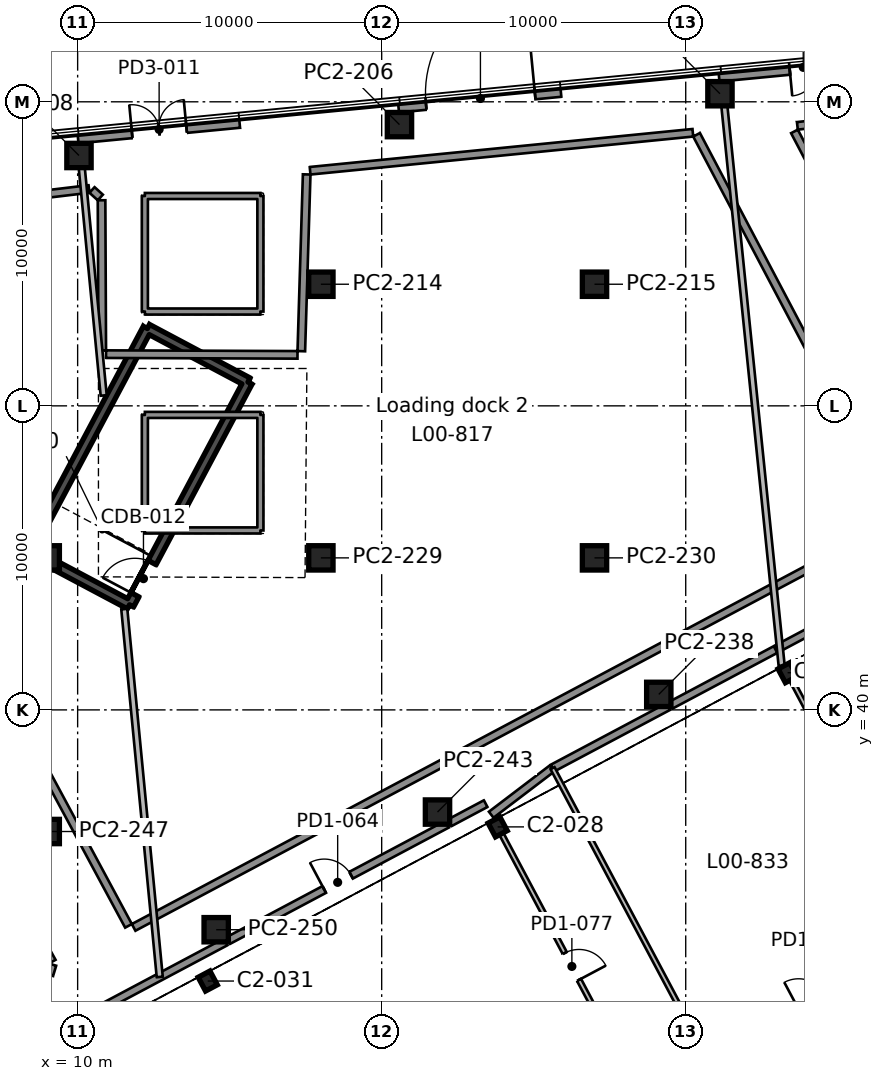
"""IFC4 building model, lengths in metres.
Left out: names, types, materials, properties, quantities, classifications, styles, units other than length and angle.
Written with IfcOpenShell. Run it as: python <this file> out.ifc"""

import sys

from ifc_helpers import new_model, si_unit, direction, frame, frame_2d, origin, origin_2d, place, context, subcontext, project, spatial, rectangle, i_section, extrude, element, fill, save


model = new_model("IFC4")
c1 = context("Model", 3, precision=1e-05, world=origin(), true_north=direction((0.0, 1.0)))
c2 = subcontext(c1, "Body", "Model", "MODEL_VIEW")
j1 = project(units=[si_unit("LENGTHUNIT", "METRE"), si_unit("PLANEANGLEUNIT", "RADIAN")], contexts=[c1])
p1 = place(None, origin())
s1 = spatial("IfcSite", under=j1, at=p1, CompositionType="ELEMENT")
p2 = place(p1, origin())
s2 = spatial("IfcBuilding", under=s1, at=p2, CompositionType="ELEMENT")
p3 = place(p2, origin())
s3 = spatial("IfcBuildingStorey", under=s2, at=p3, CompositionType="ELEMENT", Elevation=0.0)
for number, where, z_axis, x_axis in (
    (1, (14.279, 31.082, 0.0), (0.0, 0.0, 1.0), (-0.883, -0.469, 0.0)),
    (2, (23.815, 36.152, 0.0), (0.0, 0.0, 1.0), (-0.883, -0.469, 0.0)),
    (3, (33.351, 41.223, 0.0), (0.0, 0.0, 1.0), (-0.883, -0.469, 0.0)),
):
    element("IfcColumn", number, at=place(p3, frame(where, z_axis=z_axis, x_axis=x_axis)), inside=s3, PredefinedType="COLUMN", context=c2, shape_type="SweptSolid", body=[
        extrude(i_section(OverallWidth=0.437, OverallDepth=0.513, WebThickness=0.061, FlangeThickness=0.097, FilletRadius=0.015, at=origin_2d()), origin(), (0.0, 0.0, 1.0), 7.0),
    ])
p4 = place(p3, frame((12.293, 52.544, 0.0), z_axis=(0.0, 0.0, 1.0), x_axis=(0.882948761726, -0.46946936446, 0.0)))
e4 = element("IfcWall", 4, at=p4, inside=s3, PredefinedType="SHEAR", context=c2, shape_type="SweptSolid", body=[
    extrude(rectangle(XDim=3.75, YDim=0.3, at=frame_2d((1.875, 0.0))), origin(), (0.0, 0.0, 1.0), 7.0),
])
p5 = place(p3, frame((15.604, 50.784, 0.0), z_axis=(0.0, 0.0, 1.0), x_axis=(-0.469464178475, -0.882951519127, 0.0)))
e5 = element("IfcWall", 5, at=p5, inside=s3, PredefinedType="SHEAR", context=c2, shape_type="SweptSolid", body=[
    extrude(rectangle(XDim=8.3, YDim=0.3, at=frame_2d((4.15, 0.0))), origin(), (0.0, 0.0, 1.0), 7.0),
])
p6 = place(p5, frame((6.725, 0.0, 0.0)))
e6 = element("IfcOpeningElement", 6, at=p6, cuts=e5, PredefinedType="OPENING", context=c2, shape_type="SweptSolid", body=[
    extrude(rectangle(XDim=1.2, YDim=2.1, at=frame_2d((0.6, 1.05))), frame((0.0, 0.16, 0.0), z_axis=(0.0, -1.0, 0.0), x_axis=(1.0, 0.0, 0.0)), (0.0, 0.0, 1.0), 0.32),
])
p7 = place(p3, frame((11.707, 43.456, 0.0), z_axis=(0.0, 0.0, 1.0), x_axis=(-0.882948761726, 0.46946936446, 0.0)))
e7 = element("IfcWall", 7, at=p7, inside=s3, PredefinedType="SHEAR", context=c2, shape_type="SweptSolid", body=[
    extrude(rectangle(XDim=3.75, YDim=0.3, at=frame_2d((1.875, 0.0))), origin(), (0.0, 0.0, 1.0), 7.0),
])
p8 = place(p3, frame((8.396, 45.216, 0.0), z_axis=(0.0, 0.0, 1.0), x_axis=(0.469464178475, 0.882951519127, 0.0)))
e8 = element("IfcWall", 8, at=p8, inside=s3, PredefinedType="SHEAR", context=c2, shape_type="SweptSolid", body=[
    extrude(rectangle(XDim=8.3, YDim=0.3, at=frame_2d((4.15, 0.0))), origin(), (0.0, 0.0, 1.0), 7.0),
])
for number, where, z_axis, x_axis in (
    (9, (14.557, 32.77, 0.0), (0.0, 0.0, 1.0), (1.0, 0.0, 0.0)),
    (10, (9.0, 36.0, 0.0), (0.0, 0.0, 1.0), (1.0, 0.0, 0.0)),
    (11, (21.836, 36.64, 0.0), (0.0, 0.0, 1.0), (1.0, 0.0, 0.0)),
    (12, (29.114, 40.51, 0.0), (0.0, 0.0, 1.0), (1.0, 0.0, 0.0)),
    (13, (9.0, 45.0, 0.0), (0.0, 0.0, 1.0), (1.0, 0.0, 0.0)),
    (14, (18.0, 45.0, 0.0), (0.0, 0.0, 1.0), (1.0, 0.0, 0.0)),
    (15, (27.0, 45.0, 0.0), (0.0, 0.0, 1.0), (1.0, 0.0, 0.0)),
    (16, (18.0, 54.0, 0.0), (0.0, 0.0, 1.0), (1.0, 0.0, 0.0)),
    (17, (27.0, 54.0, 0.0), (0.0, 0.0, 1.0), (1.0, 0.0, 0.0)),
    (18, (10.044, 58.234, 0.0), (0.0, 0.0, 1.0), (1.0, 0.0, 0.0)),
    (19, (20.585, 59.25, 0.0), (0.0, 0.0, 1.0), (1.0, 0.0, 0.0)),
    (20, (31.126, 60.266, 0.0), (0.0, 0.0, 1.0), (1.0, 0.0, 0.0)),
):
    element("IfcColumn", number, at=place(p3, frame(where, z_axis=z_axis, x_axis=x_axis)), inside=s3, PredefinedType="COLUMN", context=c2, shape_type="SweptSolid", body=[
        extrude(rectangle(XDim=0.8, YDim=0.8, at=origin_2d()), origin(), (0.0, 0.0, 1.0), 6.37),
    ])
p9 = place(p3, frame((36.458, 61.382, 0.0), z_axis=(0.0, 0.0, 1.0), x_axis=(-0.99538901021, -0.095920375068, 0.0)))
e21 = element("IfcWall", 21, at=p9, inside=s3, PredefinedType="SOLIDWALL", context=c2, shape_type="SweptSolid", body=[
    extrude(rectangle(XDim=5.391, YDim=0.4, at=frame_2d((2.695, 0.0))), origin(), (0.0, 0.0, 1.0), 6.37),
])
p10 = place(p9, frame((2.154, 0.0, 0.0)))
e22 = element("IfcOpeningElement", 22, at=p10, cuts=e21, PredefinedType="OPENING", context=c2, shape_type="SweptSolid", body=[
    extrude(rectangle(XDim=0.9, YDim=2.1, at=frame_2d((0.45, 1.05))), frame((0.0, 0.21, 0.0), z_axis=(0.0, -1.0, 0.0), x_axis=(1.0, 0.0, 0.0)), (0.0, 0.0, 1.0), 0.42),
])
p11 = place(p3, frame((25.89, 60.364, 0.0), z_axis=(0.0, 0.0, 1.0), x_axis=(-0.995386401867, -0.095947438618, 0.0)))
e23 = element("IfcWall", 23, at=p11, inside=s3, PredefinedType="SOLIDWALL", context=c2, shape_type="SweptSolid", body=[
    extrude(rectangle(XDim=5.364, YDim=0.4, at=frame_2d((2.682, 0.0))), origin(), (0.0, 0.0, 1.0), 6.37),
])
p12 = place(p11, frame((0.854, 0.0, 0.0)))
e24 = element("IfcOpeningElement", 24, at=p12, cuts=e23, PredefinedType="OPENING", context=c2, shape_type="SweptSolid", body=[
    extrude(rectangle(XDim=3.6, YDim=4.5, at=frame_2d((1.8, 2.25))), frame((0.0, 0.21, 0.0), z_axis=(0.0, -1.0, 0.0), x_axis=(1.0, 0.0, 0.0)), (0.0, 0.0, 1.0), 0.42),
])
p13 = place(p3, frame((15.322, 59.345, 0.0), z_axis=(0.0, 0.0, 1.0), x_axis=(-0.995385451448, -0.095957298035, 0.0)))
e25 = element("IfcWall", 25, at=p13, inside=s3, PredefinedType="SOLIDWALL", context=c2, shape_type="SweptSolid", body=[
    extrude(rectangle(XDim=5.338, YDim=0.4, at=frame_2d((2.669, 0.0))), origin(), (0.0, 0.0, 1.0), 6.37),
])
p14 = place(p13, frame((1.754, 0.0, 0.0)))
e26 = element("IfcOpeningElement", 26, at=p14, cuts=e25, PredefinedType="OPENING", context=c2, shape_type="SweptSolid", body=[
    extrude(rectangle(XDim=1.8, YDim=2.1, at=frame_2d((0.9, 1.05))), frame((0.0, 0.21, 0.0), z_axis=(0.0, -1.0, 0.0), x_axis=(1.0, 0.0, 0.0)), (0.0, 0.0, 1.0), 0.42),
])
p15 = place(p3, frame((9.175, 31.622, 7.0), z_axis=(0.0, 0.0, 1.0), x_axis=(-0.291902944201, -0.956447944829, 0.0)))
e27 = element("IfcWall", 27, at=p15, inside=s3, PredefinedType="STANDARD", context=c2, shape_type="SweptSolid", body=[
    extrude(rectangle(XDim=0.354, YDim=0.25, at=frame_2d((0.177, 0.0))), origin(), (0.0, 0.0, 1.0), 0.65),
])
p16 = place(p3, frame((-0.568, 49.302, 7.0), z_axis=(0.0, 0.0, 1.0), x_axis=(0.484320034281, -0.874890909996, 0.0)))
e28 = element("IfcWall", 28, at=p16, inside=s3, PredefinedType="STANDARD", context=c2, shape_type="SweptSolid", body=[
    extrude(rectangle(XDim=20.096, YDim=0.25, at=frame_2d((10.048, 0.0))), origin(), (0.0, 0.0, 1.0), 0.65),
])
p17 = place(p3, frame((2.855, 56.234, 7.0), z_axis=(0.0, 0.0, 1.0), x_axis=(0.992929675545, 0.118704083423, 0.0)))
e29 = element("IfcWall", 29, at=p17, inside=s3, PredefinedType="STANDARD", context=c2, shape_type="SweptSolid", body=[
    extrude(rectangle(XDim=7.573, YDim=0.25, at=frame_2d((3.786, 0.0))), origin(), (0.0, 0.0, 1.0), 0.65),
])
p18 = place(p3, frame((10.473, 57.101, 7.0), z_axis=(0.0, 0.0, 1.0), x_axis=(0.740419787082, -0.672144730618, 0.0)))
e30 = element("IfcWall", 30, at=p18, inside=s3, PredefinedType="STANDARD", context=c2, shape_type="SweptSolid", body=[
    extrude(rectangle(XDim=0.368, YDim=0.25, at=frame_2d((0.184, 0.0))), origin(), (0.0, 0.0, 1.0), 0.65),
])
p19 = place(p3, frame((10.787, 56.762, 7.0), z_axis=(0.0, 0.0, 1.0), x_axis=(0.004598903003, -0.99998942499, 0.0)))
e31 = element("IfcWall", 31, at=p19, inside=s3, PredefinedType="STANDARD", context=c2, shape_type="SweptSolid", body=[
    extrude(rectangle(XDim=4.937, YDim=0.25, at=frame_2d((2.469, 0.0))), origin(), (0.0, 0.0, 1.0), 0.65),
])
p20 = place(p3, frame((10.934, 51.7, 7.0), z_axis=(0.0, 0.0, 1.0), x_axis=(0.999993217199, -0.00368314487, 0.0)))
e32 = element("IfcWall", 32, at=p20, inside=s3, PredefinedType="STANDARD", context=c2, shape_type="SweptSolid", body=[
    extrude(rectangle(XDim=6.297, YDim=0.25, at=frame_2d((3.148, 0.0))), origin(), (0.0, 0.0, 1.0), 0.65),
])
p21 = place(p3, frame((17.356, 51.798, 7.0), z_axis=(0.0, 0.0, 1.0), x_axis=(0.030389518646, 0.999538131917, 0.0)))
e33 = element("IfcWall", 33, at=p21, inside=s3, PredefinedType="STANDARD", context=c2, shape_type="SweptSolid", body=[
    extrude(rectangle(XDim=5.816, YDim=0.25, at=frame_2d((2.908, 0.0))), origin(), (0.0, 0.0, 1.0), 0.65),
])
p22 = place(p3, frame((17.646, 57.732, 7.0), z_axis=(0.0, 0.0, 1.0), x_axis=(0.9951157931, 0.098714529444, 0.0)))
e34 = element("IfcWall", 34, at=p22, inside=s3, PredefinedType="STANDARD", context=c2, shape_type="SweptSolid", body=[
    extrude(rectangle(XDim=12.65, YDim=0.25, at=frame_2d((6.325, 0.0))), origin(), (0.0, 0.0, 1.0), 0.65),
])
p23 = place(p3, frame((30.357, 58.915, 7.0), z_axis=(0.0, 0.0, 1.0), x_axis=(0.466457319903, -0.8845437065, 0.0)))
e35 = element("IfcWall", 35, at=p23, inside=s3, PredefinedType="STANDARD", context=c2, shape_type="SweptSolid", body=[
    extrude(rectangle(XDim=14.208, YDim=0.25, at=frame_2d((7.104, 0.0))), origin(), (0.0, 0.0, 1.0), 0.65),
])
p24 = place(p3, frame((36.929, 46.186, 7.0), z_axis=(0.0, 0.0, 1.0), x_axis=(-0.882949235495, -0.469468473423, 0.0)))
e36 = element("IfcWall", 36, at=p24, inside=s3, PredefinedType="STANDARD", context=c2, shape_type="SweptSolid", body=[
    extrude(rectangle(XDim=28.414, YDim=0.25, at=frame_2d((14.207, 0.0))), origin(), (0.0, 0.0, 1.0), 0.65),
])
p25 = place(p3, frame((11.673, 32.897, 7.0), z_axis=(0.0, 0.0, 1.0), x_axis=(-0.474018312506, 0.880514985341, 0.0)))
e37 = element("IfcWall", 37, at=p25, inside=s3, PredefinedType="STANDARD", context=c2, shape_type="SweptSolid", body=[
    extrude(rectangle(XDim=22.327, YDim=0.25, at=frame_2d((11.164, 0.0))), origin(), (0.0, 0.0, 1.0), 0.65),
])
p26 = place(p3, frame((39.532, 47.701, 7.0), z_axis=(0.0, 0.0, 1.0), x_axis=(-0.465482185558, 0.88505724952, 0.0)))
e38 = element("IfcWall", 38, at=p26, inside=s3, PredefinedType="STANDARD", context=c2, shape_type="SweptSolid", body=[
    extrude(rectangle(XDim=12.795, YDim=0.25, at=frame_2d((6.398, 0.0))), origin(), (0.0, 0.0, 1.0), 0.65),
])
p27 = place(p3, frame((33.673, 59.208, 7.0), z_axis=(0.0, 0.0, 1.0), x_axis=(0.993598399312, 0.112969999932, 0.0)))
e39 = element("IfcWall", 39, at=p27, inside=s3, PredefinedType="STANDARD", context=c2, shape_type="SweptSolid", body=[
    extrude(rectangle(XDim=9.9, YDim=0.25, at=frame_2d((4.95, 0.0))), origin(), (0.0, 0.0, 1.0), 0.65),
])
p28 = place(p3, frame((16.011, 45.902, 6.92), z_axis=(0.0, 0.0, 1.0), x_axis=(-1.0, 0.0, 0.0)))
e40 = element("IfcWall", 40, at=p28, inside=s3, PredefinedType="SOLIDWALL", context=c2, shape_type="SweptSolid", body=[
    extrude(rectangle(XDim=3.8, YDim=0.2, at=frame_2d((1.9, 0.0))), origin(), (0.0, 0.0, 1.0), 0.18),
])
p29 = place(p3, frame((12.211, 45.902, 6.92), z_axis=(0.0, 0.0, 1.0), x_axis=(0.0, 1.0, 0.0)))
e41 = element("IfcWall", 41, at=p29, inside=s3, PredefinedType="SOLIDWALL", context=c2, shape_type="SweptSolid", body=[
    extrude(rectangle(XDim=3.8, YDim=0.2, at=frame_2d((1.9, 0.0))), origin(), (0.0, 0.0, 1.0), 0.18),
])
p30 = place(p3, frame((12.211, 49.702, 6.92), z_axis=(0.0, 0.0, 1.0), x_axis=(1.0, 0.0, 0.0)))
e42 = element("IfcWall", 42, at=p30, inside=s3, PredefinedType="SOLIDWALL", context=c2, shape_type="SweptSolid", body=[
    extrude(rectangle(XDim=3.8, YDim=0.2, at=frame_2d((1.9, 0.0))), origin(), (0.0, 0.0, 1.0), 0.18),
])
p31 = place(p3, frame((16.011, 49.702, 6.92), z_axis=(0.0, 0.0, 1.0), x_axis=(0.0, -1.0, 0.0)))
e43 = element("IfcWall", 43, at=p31, inside=s3, PredefinedType="SOLIDWALL", context=c2, shape_type="SweptSolid", body=[
    extrude(rectangle(XDim=3.8, YDim=0.2, at=frame_2d((1.9, 0.0))), origin(), (0.0, 0.0, 1.0), 0.18),
])
for number, where, z_axis, x_axis in (
    (44, (16.011, 53.102, 6.92), (0.0, 0.0, 1.0), (-1.0, 0.0, 0.0)),
    (45, (12.211, 53.102, 6.92), (0.0, 0.0, 1.0), (0.0, 1.0, 0.0)),
    (46, (12.211, 56.902, 6.92), (0.0, 0.0, 1.0), (1.0, 0.0, 0.0)),
    (47, (16.011, 56.902, 6.92), (0.0, 0.0, 1.0), (0.0, -1.0, 0.0)),
):
    element("IfcWall", number, at=place(p3, frame(where, z_axis=z_axis, x_axis=x_axis)), inside=s3, PredefinedType="SOLIDWALL", context=c2, shape_type="SweptSolid", body=[
        extrude(rectangle(XDim=3.8, YDim=0.2, at=frame_2d((1.9, 0.0))), origin(), (0.0, 0.0, 1.0), 0.18),
    ])
p32 = place(p3, frame((31.271, 59.866, 0.0), z_axis=(0.0, 0.0, 1.0), x_axis=(0.10182537806, -0.994802288087, 0.0)))
e48 = element("IfcWall", 48, at=p32, inside=s3, PredefinedType="PARTITIONING", context=c2, shape_type="SweptSolid", body=[
    extrude(rectangle(XDim=18.51, YDim=0.2, at=frame_2d((9.255, 0.0))), origin(), (0.0, 0.0, 1.0), 6.37),
])
p33 = place(p3, frame((32.989, 42.004, 0.0), z_axis=(0.0, 0.0, 1.0), x_axis=(0.882961044449, 0.46944626315, 0.0)))
e49 = element("IfcWall", 49, at=p33, inside=s3, PredefinedType="SOLIDWALL", context=c2, shape_type="SweptSolid", body=[
    extrude(rectangle(XDim=2.453, YDim=0.25, at=frame_2d((1.227, 0.0))), origin(), (0.0, 0.0, 1.0), 6.37),
])
p34 = place(p3, frame((10.135, 57.834, 0.0), z_axis=(0.0, 0.0, 1.0), x_axis=(0.095941692949, -0.995386955688, 0.0)))
e50 = element("IfcWall", 50, at=p34, inside=s3, PredefinedType="PARTITIONING", context=c2, shape_type="SweptSolid", body=[
    extrude(rectangle(XDim=7.527, YDim=0.2, at=frame_2d((3.764, 0.0))), origin(), (0.0, 0.0, 1.0), 6.37),
])
p35 = place(p3, frame((11.534, 43.315, 0.0), z_axis=(0.0, 0.0, 1.0), x_axis=(0.095933245663, -0.995387769855, 0.0)))
e51 = element("IfcWall", 51, at=p35, inside=s3, PredefinedType="PARTITIONING", context=c2, shape_type="SweptSolid", body=[
    extrude(rectangle(XDim=12.155, YDim=0.2, at=frame_2d((6.077, 0.0))), origin(), (0.0, 0.0, 1.0), 6.37),
])
p36 = place(p3, frame((23.603, 36.552, 0.0), z_axis=(0.0, 0.0, 1.0), x_axis=(0.796006775893, 0.605287710706, 0.0)))
e52 = element("IfcWall", 52, at=p36, inside=s3, PredefinedType="SOLIDWALL", context=c2, shape_type="SweptSolid", body=[
    extrude(rectangle(XDim=2.513, YDim=0.25, at=frame_2d((1.256, 0.0))), origin(), (0.0, 0.0, 1.0), 6.37),
])
p37 = place(p3, frame((25.619, 38.085, 0.0), z_axis=(0.0, 0.0, 1.0), x_axis=(0.88292581618, 0.469512516471, 0.0)))
e53 = element("IfcWall", 53, at=p37, inside=s3, PredefinedType="SOLIDWALL", context=c2, shape_type="SweptSolid", body=[
    extrude(rectangle(XDim=4.313, YDim=0.25, at=frame_2d((2.156, 0.0))), origin(), (0.0, 0.0, 1.0), 6.37),
])
p38 = place(p3, frame((29.514, 40.156, 0.0), z_axis=(0.0, 0.0, 1.0), x_axis=(0.882952549127, 0.469462241283, 0.0)))
e54 = element("IfcWall", 54, at=p38, inside=s3, PredefinedType="SOLIDWALL", context=c2, shape_type="SweptSolid", body=[
    extrude(rectangle(XDim=3.895, YDim=0.25, at=frame_2d((1.948, 0.0))), origin(), (0.0, 0.0, 1.0), 6.37),
])
p39 = place(p3, frame((12.706, 31.219, 0.0), z_axis=(0.0, 0.0, 1.0), x_axis=(0.882909290673, 0.469543591633, 0.0)))
e55 = element("IfcWall", 55, at=p39, inside=s3, PredefinedType="SOLIDWALL", context=c2, shape_type="SweptSolid", body=[
    extrude(rectangle(XDim=2.451, YDim=0.25, at=frame_2d((1.226, 0.0))), origin(), (0.0, 0.0, 1.0), 6.37),
])
p40 = place(p3, frame((14.957, 32.416, 0.0), z_axis=(0.0, 0.0, 1.0), x_axis=(0.882948003129, 0.46947079118, 0.0)))
e56 = element("IfcWall", 56, at=p40, inside=s3, PredefinedType="SOLIDWALL", context=c2, shape_type="SweptSolid", body=[
    extrude(rectangle(XDim=8.145, YDim=0.25, at=frame_2d((4.072, 0.0))), origin(), (0.0, 0.0, 1.0), 6.37),
])
p41 = place(p40, frame((3.572, 0.0, 0.0)))
e57 = element("IfcOpeningElement", 57, at=p41, cuts=e56, PredefinedType="OPENING", context=c2, shape_type="SweptSolid", body=[
    extrude(rectangle(XDim=1.0, YDim=2.1, at=frame_2d((0.5, 1.05))), frame((0.0, 0.135, 0.0), z_axis=(0.0, -1.0, 0.0), x_axis=(1.0, 0.0, 0.0)), (0.0, 0.0, 1.0), 0.27),
])
p42 = place(p3, frame((22.236, 36.287, 0.0), z_axis=(0.0, 0.0, 1.0), x_axis=(0.882931801402, 0.469501260993, 0.0)))
e58 = element("IfcWall", 58, at=p42, inside=s3, PredefinedType="SOLIDWALL", context=c2, shape_type="SweptSolid", body=[
    extrude(rectangle(XDim=1.341, YDim=0.25, at=frame_2d((0.67, 0.0))), origin(), (0.0, 0.0, 1.0), 6.37),
])
p43 = place(p3, frame((7.679, 28.546, 0.0), z_axis=(0.0, 0.0, 1.0), x_axis=(0.882942382041, 0.469481362779, 0.0)))
e59 = element("IfcWall", 59, at=p43, inside=s3, PredefinedType="SOLIDWALL", context=c2, shape_type="SweptSolid", body=[
    extrude(rectangle(XDim=5.692, YDim=0.25, at=frame_2d((2.846, 0.0))), origin(), (0.0, 0.0, 1.0), 6.37),
])
p44 = place(p3, frame((37.755, 32.307, 0.0), z_axis=(0.0, 0.0, 1.0), x_axis=(-0.882938312015, -0.469489017099, 0.0)))
e60 = element("IfcWall", 60, at=p44, inside=s3, PredefinedType="PARTITIONING", context=c2, shape_type="SweptSolid", body=[
    extrude(rectangle(XDim=8.003, YDim=0.15, at=frame_2d((4.001, 0.0))), origin(), (0.0, 0.0, 1.0), 6.55),
])
p45 = place(p44, frame((3.58, 0.0, 0.0)))
e61 = element("IfcOpeningElement", 61, at=p45, cuts=e60, PredefinedType="OPENING", context=c2, shape_type="SweptSolid", body=[
    extrude(rectangle(XDim=1.0, YDim=2.1, at=frame_2d((0.5, 1.05))), frame((0.0, 0.085, 0.0), z_axis=(0.0, -1.0, 0.0), x_axis=(1.0, 0.0, 0.0)), (0.0, 0.0, 1.0), 0.17),
])
p46 = place(p3, frame((30.689, 28.549, 0.0), z_axis=(0.0, 0.0, 1.0), x_axis=(-0.469470880923, 0.882947955411, 0.0)))
e62 = element("IfcWall", 62, at=p46, inside=s3, PredefinedType="PARTITIONING", context=c2, shape_type="SweptSolid", body=[
    extrude(rectangle(XDim=10.8, YDim=0.15, at=frame_2d((5.4, 0.0))), origin(), (0.0, 0.0, 1.0), 6.55),
])
p47 = place(p3, frame((23.936, 35.926, 0.0), z_axis=(0.0, 0.0, 1.0), x_axis=(0.469473365889, -0.882946634129, 0.0)))
e63 = element("IfcWall", 63, at=p47, inside=s3, PredefinedType="PARTITIONING", context=c2, shape_type="SweptSolid", body=[
    extrude(rectangle(XDim=9.687, YDim=0.15, at=frame_2d((4.844, 0.0))), origin(), (0.0, 0.0, 1.0), 6.55),
])
p48 = place(p47, frame((4.442, 0.0, 0.0)))
e64 = element("IfcOpeningElement", 64, at=p48, cuts=e63, PredefinedType="OPENING", context=c2, shape_type="SweptSolid", body=[
    extrude(rectangle(XDim=1.0, YDim=2.1, at=frame_2d((0.5, 1.05))), frame((0.0, 0.085, 0.0), z_axis=(0.0, -1.0, 0.0), x_axis=(1.0, 0.0, 0.0)), (0.0, 0.0, 1.0), 0.17),
])
p49 = place(p3, frame((37.85, 32.762, 0.0), z_axis=(0.0, 0.0, 1.0), x_axis=(-0.469481854544, 0.882942120557, 0.0)))
e65 = element("IfcWall", 65, at=p49, inside=s3, PredefinedType="PARTITIONING", context=c2, shape_type="SweptSolid", body=[
    extrude(rectangle(XDim=9.326, YDim=0.15, at=frame_2d((4.663, 0.0))), origin(), (0.0, 0.0, 1.0), 6.55),
])
p50 = place(p6, frame((1.2, 0.0, 0.0), z_axis=(0.0, 0.0, 1.0), x_axis=(-1.0, 0.0, 0.0)))
e66 = element("IfcDoor", 66, at=p50, inside=s3, OperationType="SINGLE_SWING_LEFT", PredefinedType="DOOR", context=c2, shape_type="SweptSolid", body=[
    extrude(rectangle(XDim=1.2, YDim=2.1, at=frame_2d((0.6, 1.05))), frame((0.0, 0.025, 0.0), z_axis=(0.0, -1.0, 0.0), x_axis=(1.0, 0.0, 0.0)), (0.0, 0.0, 1.0), 0.05),
])
fill(e6, e66)
p51 = place(p10, origin())
e67 = element("IfcDoor", 67, at=p51, inside=s3, OperationType="SINGLE_SWING_RIGHT", PredefinedType="DOOR", context=c2, shape_type="SweptSolid", body=[
    extrude(rectangle(XDim=0.9, YDim=2.1, at=frame_2d((0.45, 1.05))), frame((0.0, 0.025, 0.0), z_axis=(0.0, -1.0, 0.0), x_axis=(1.0, 0.0, 0.0)), (0.0, 0.0, 1.0), 0.05),
])
fill(e22, e67)
p52 = place(p12, frame((3.6, 0.0, 0.0), z_axis=(0.0, 0.0, 1.0), x_axis=(-1.0, 0.0, 0.0)))
e68 = element("IfcDoor", 68, at=p52, inside=s3, OperationType="SLIDING_TO_LEFT", PredefinedType="DOOR", context=c2, shape_type="SweptSolid", body=[
    extrude(rectangle(XDim=3.6, YDim=4.5, at=frame_2d((1.8, 2.25))), frame((0.0, 0.025, 0.0), z_axis=(0.0, -1.0, 0.0), x_axis=(1.0, 0.0, 0.0)), (0.0, 0.0, 1.0), 0.05),
])
fill(e24, e68)
p53 = place(p14, frame((1.8, 0.0, 0.0), z_axis=(0.0, 0.0, 1.0), x_axis=(-1.0, 0.0, 0.0)))
e69 = element("IfcDoor", 69, at=p53, inside=s3, OperationType="DOUBLE_DOOR_SINGLE_SWING", PredefinedType="DOOR", context=c2, shape_type="SweptSolid", body=[
    extrude(rectangle(XDim=1.8, YDim=2.1, at=frame_2d((0.9, 1.05))), frame((0.0, 0.025, 0.0), z_axis=(0.0, -1.0, 0.0), x_axis=(1.0, 0.0, 0.0)), (0.0, 0.0, 1.0), 0.05),
])
fill(e26, e69)
p54 = place(p3, frame((0.0, 0.0, 6.37)))
p55 = place(p54, frame((14.111, 55.002, 0.0)))
p56 = place(p55, frame((0.0, 0.0, 0.5)))
e70 = element("IfcWindow", 70, at=p56, inside=s3, PartitioningType="SINGLE_PANEL", PredefinedType="SKYLIGHT", context=c2, shape_type="SweptSolid", body=[
    extrude(rectangle(XDim=3.6, YDim=3.6, at=origin_2d()), origin(), (0.0, 0.0, 1.0), 0.05),
])
p57 = place(p48, origin())
e71 = element("IfcDoor", 71, at=p57, inside=s3, OperationType="SINGLE_SWING_RIGHT", PredefinedType="DOOR", context=c2, shape_type="SweptSolid", body=[
    extrude(rectangle(XDim=1.0, YDim=2.1, at=frame_2d((0.5, 1.05))), frame((0.0, 0.025, 0.0), z_axis=(0.0, -1.0, 0.0), x_axis=(1.0, 0.0, 0.0)), (0.0, 0.0, 1.0), 0.05),
])
fill(e64, e71)
p58 = place(p41, origin())
e72 = element("IfcDoor", 72, at=p58, inside=s3, OperationType="SINGLE_SWING_LEFT", PredefinedType="DOOR", context=c2, shape_type="SweptSolid", body=[
    extrude(rectangle(XDim=1.0, YDim=2.1, at=frame_2d((0.5, 1.05))), frame((0.0, 0.025, 0.0), z_axis=(0.0, -1.0, 0.0), x_axis=(1.0, 0.0, 0.0)), (0.0, 0.0, 1.0), 0.05),
])
fill(e57, e72)
p59 = place(p45, frame((1.0, 0.0, 0.0), z_axis=(0.0, 0.0, 1.0), x_axis=(-1.0, 0.0, 0.0)))
e73 = element("IfcDoor", 73, at=p59, inside=s3, OperationType="SINGLE_SWING_LEFT", PredefinedType="DOOR", context=c2, shape_type="SweptSolid", body=[
    extrude(rectangle(XDim=1.0, YDim=2.1, at=frame_2d((0.5, 1.05))), frame((0.0, 0.025, 0.0), z_axis=(0.0, -1.0, 0.0), x_axis=(1.0, 0.0, 0.0)), (0.0, 0.0, 1.0), 0.05),
])
fill(e61, e73)
save(model, sys.argv[1])
